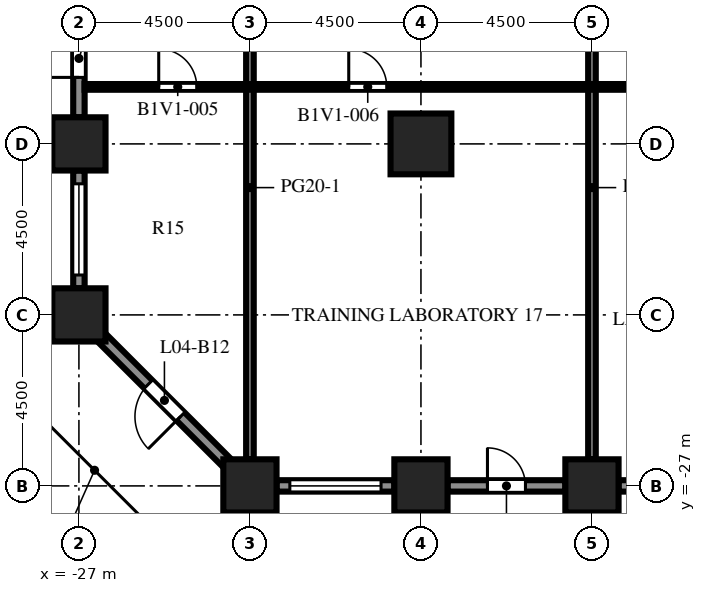
"""IFC4 building model, lengths in metres.
Left out: names, types, materials, properties, quantities, classifications, styles, units other than length and angle.
Written with IfcOpenShell. Run it as: python <this file> out.ifc"""

import sys

from ifc_helpers import new_model, si_unit, direction, frame, frame_2d, origin, origin_2d, place, context, subcontext, project, spatial, rectangle, extrude, element, fill, save


model = new_model("IFC4")
c1 = context("Model", 3, precision=1e-05, world=origin(), true_north=direction((0.0, 1.0)))
c2 = subcontext(c1, "Body", "Model", "MODEL_VIEW")
j1 = project(units=[si_unit("LENGTHUNIT", "METRE"), si_unit("PLANEANGLEUNIT", "RADIAN")], contexts=[c1])
p1 = place(None, origin())
s1 = spatial("IfcSite", under=j1, at=p1, CompositionType="ELEMENT")
p2 = place(p1, origin())
s2 = spatial("IfcBuilding", under=s1, at=p2, CompositionType="ELEMENT")
p3 = place(p2, frame((0.0, 0.0, 19.5)))
s3 = spatial("IfcBuildingStorey", under=s2, at=p3, CompositionType="ELEMENT", Elevation=19.5)
for number, where, z_axis, x_axis in (
    (1, (-27.0, -22.5, 0.0), (0.0, 0.0, 1.0), (1.0, 0.0, 0.0)),
    (2, (-27.0, -18.0, 0.0), (0.0, 0.0, 1.0), (1.0, 0.0, 0.0)),
    (3, (-22.5, -27.0, 0.0), (0.0, 0.0, 1.0), (1.0, 0.0, 0.0)),
    (4, (-18.0, -27.0, 0.0), (0.0, 0.0, 1.0), (1.0, 0.0, 0.0)),
    (5, (-13.5, -27.0, 0.0), (0.0, 0.0, 1.0), (1.0, 0.0, 0.0)),
):
    element("IfcColumn", number, at=place(p3, frame(where, z_axis=z_axis, x_axis=x_axis)), inside=s3, PredefinedType="COLUMN", context=c2, shape_type="SweptSolid", body=[
        extrude(rectangle(XDim=1.4, YDim=1.4, at=origin_2d()), origin(), (0.0, 0.0, 1.0), 4.1),
    ])
p4 = place(p3, frame((-18.0, -18.0, 0.0), z_axis=(0.0, 0.0, 1.0), x_axis=(1.0, 0.0, 0.0)))
e6 = element("IfcColumn", 6, at=p4, inside=s3, PredefinedType="COLUMN", context=c2, shape_type="SweptSolid", body=[
    extrude(rectangle(XDim=1.6, YDim=1.6, at=origin_2d()), origin(), (0.0, 0.0, 1.0), 4.1),
])
p5 = place(p3, frame((-18.7, -27.0, 0.0), z_axis=(0.0, 0.0, 1.0), x_axis=(-1.0, 0.0, 0.0)))
e7 = element("IfcWall", 7, at=p5, inside=s3, PredefinedType="SOLIDWALL", context=c2, shape_type="SweptSolid", body=[
    extrude(rectangle(XDim=3.1, YDim=0.3, at=frame_2d((1.55, 0.0))), origin(), (0.0, 0.0, 1.0), 2.75),
])
p6 = place(p5, frame((0.35, 0.0, 0.8)))
e8 = element("IfcOpeningElement", 8, at=p6, cuts=e7, PredefinedType="OPENING", context=c2, shape_type="SweptSolid", body=[
    extrude(rectangle(XDim=2.4, YDim=1.7, at=frame_2d((1.2, 0.85))), frame((0.0, 0.16, 0.0), z_axis=(0.0, -1.0, 0.0), x_axis=(1.0, 0.0, 0.0)), (0.0, 0.0, 1.0), 0.32),
])
p7 = place(p3, frame((-14.2, -27.0, 0.0), z_axis=(0.0, 0.0, 1.0), x_axis=(-1.0, 0.0, 0.0)))
e9 = element("IfcWall", 9, at=p7, inside=s3, PredefinedType="SOLIDWALL", context=c2, shape_type="SweptSolid", body=[
    extrude(rectangle(XDim=3.1, YDim=0.3, at=frame_2d((1.55, 0.0))), origin(), (0.0, 0.0, 1.0), 2.75),
])
p8 = place(p7, frame((1.05, 0.0, 0.0)))
e10 = element("IfcOpeningElement", 10, at=p8, cuts=e9, PredefinedType="OPENING", context=c2, shape_type="SweptSolid", body=[
    extrude(rectangle(XDim=1.0, YDim=2.2, at=frame_2d((0.5, 1.1))), frame((0.0, 0.16, 0.0), z_axis=(0.0, -1.0, 0.0), x_axis=(1.0, 0.0, 0.0)), (0.0, 0.0, 1.0), 0.32),
])
p9 = place(p3, frame((-9.7, -27.0, 0.0), z_axis=(0.0, 0.0, 1.0), x_axis=(-1.0, 0.0, 0.0)))
e11 = element("IfcWall", 11, at=p9, inside=s3, PredefinedType="SOLIDWALL", context=c2, shape_type="SweptSolid", body=[
    extrude(rectangle(XDim=3.1, YDim=0.3, at=frame_2d((1.55, 0.0))), origin(), (0.0, 0.0, 1.0), 2.75),
])
p10 = place(p9, frame((0.35, 0.0, 0.8)))
e12 = element("IfcOpeningElement", 12, at=p10, cuts=e11, PredefinedType="OPENING", context=c2, shape_type="SweptSolid", body=[
    extrude(rectangle(XDim=2.4, YDim=1.7, at=frame_2d((1.2, 0.85))), frame((0.0, 0.16, 0.0), z_axis=(0.0, -1.0, 0.0), x_axis=(1.0, 0.0, 0.0)), (0.0, 0.0, 1.0), 0.32),
])
p11 = place(p3, frame((-27.0, -17.3, 0.0), z_axis=(0.0, 0.0, 1.0), x_axis=(0.0, 1.0, 0.0)))
e13 = element("IfcWall", 13, at=p11, inside=s3, PredefinedType="SOLIDWALL", context=c2, shape_type="SweptSolid", body=[
    extrude(rectangle(XDim=3.1, YDim=0.3, at=frame_2d((1.55, 0.0))), origin(), (0.0, 0.0, 1.0), 2.75),
])
p12 = place(p11, frame((1.05, 0.0, 0.0)))
e14 = element("IfcOpeningElement", 14, at=p12, cuts=e13, PredefinedType="OPENING", context=c2, shape_type="SweptSolid", body=[
    extrude(rectangle(XDim=1.0, YDim=2.2, at=frame_2d((0.5, 1.1))), frame((0.0, 0.16, 0.0), z_axis=(0.0, -1.0, 0.0), x_axis=(1.0, 0.0, 0.0)), (0.0, 0.0, 1.0), 0.32),
])
p13 = place(p3, frame((-27.0, -21.8, 0.0), z_axis=(0.0, 0.0, 1.0), x_axis=(0.0, 1.0, 0.0)))
e15 = element("IfcWall", 15, at=p13, inside=s3, PredefinedType="SOLIDWALL", context=c2, shape_type="SweptSolid", body=[
    extrude(rectangle(XDim=3.1, YDim=0.3, at=frame_2d((1.55, 0.0))), origin(), (0.0, 0.0, 1.0), 2.75),
])
p14 = place(p13, frame((0.35, 0.0, 0.8)))
e16 = element("IfcOpeningElement", 16, at=p14, cuts=e15, PredefinedType="OPENING", context=c2, shape_type="SweptSolid", body=[
    extrude(rectangle(XDim=2.4, YDim=1.7, at=frame_2d((1.2, 0.85))), frame((0.0, 0.16, 0.0), z_axis=(0.0, -1.0, 0.0), x_axis=(1.0, 0.0, 0.0)), (0.0, 0.0, 1.0), 0.32),
])
p15 = place(p3, frame((-23.094, -26.406, 0.0), z_axis=(0.0, 0.0, 1.0), x_axis=(-0.707106781187, 0.707106781187, 0.0)))
e17 = element("IfcWall", 17, at=p15, inside=s3, PredefinedType="SOLIDWALL", context=c2, shape_type="SweptSolid", body=[
    extrude(rectangle(XDim=4.684, YDim=0.3, at=frame_2d((2.342, 0.0))), origin(), (0.0, 0.0, 1.0), 2.75),
])
p16 = place(p15, frame((1.742, 0.0, 0.0)))
e18 = element("IfcOpeningElement", 18, at=p16, cuts=e17, PredefinedType="OPENING", context=c2, shape_type="SweptSolid", body=[
    extrude(rectangle(XDim=1.2, YDim=2.2, at=frame_2d((0.6, 1.1))), frame((0.0, 0.16, 0.0), z_axis=(0.0, -1.0, 0.0), x_axis=(1.0, 0.0, 0.0)), (0.0, 0.0, 1.0), 0.32),
])
for number, where, z_axis, x_axis in (
    (19, (-22.5, -26.3, 0.0), (0.0, 0.0, 1.0), (0.0, 1.0, 0.0)),
    (20, (-13.5, -26.3, 0.0), (0.0, 0.0, 1.0), (0.0, 1.0, 0.0)),
):
    element("IfcWall", number, at=place(p3, frame(where, z_axis=z_axis, x_axis=x_axis)), inside=s3, PredefinedType="PARTITIONING", context=c2, shape_type="SweptSolid", body=[
        extrude(rectangle(XDim=14.3, YDim=0.2, at=frame_2d((7.15, 0.0))), origin(), (0.0, 0.0, 1.0), 3.65),
    ])
p17 = place(p3, frame((26.85, -16.5, 0.0), z_axis=(0.0, 0.0, 1.0), x_axis=(-1.0, 0.0, 0.0)))
e21 = element("IfcWall", 21, at=p17, inside=s3, PredefinedType="PARTITIONING", context=c2, shape_type="SweptSolid", body=[
    extrude(rectangle(XDim=53.7, YDim=0.15, at=frame_2d((26.85, 0.0))), origin(), (0.0, 0.0, 1.0), 3.65),
])
p18 = place(p17, frame((50.75, 0.0, 0.0)))
e22 = element("IfcOpeningElement", 22, at=p18, cuts=e21, PredefinedType="OPENING", context=c2, shape_type="SweptSolid", body=[
    extrude(rectangle(XDim=1.0, YDim=2.1, at=frame_2d((0.5, 1.05))), frame((0.0, 0.085, 0.0), z_axis=(0.0, -1.0, 0.0), x_axis=(1.0, 0.0, 0.0)), (0.0, 0.0, 1.0), 0.17),
])
p19 = place(p17, frame((45.75, 0.0, 0.0)))
e23 = element("IfcOpeningElement", 23, at=p19, cuts=e21, PredefinedType="OPENING", context=c2, shape_type="SweptSolid", body=[
    extrude(rectangle(XDim=1.0, YDim=2.1, at=frame_2d((0.5, 1.05))), frame((0.0, 0.085, 0.0), z_axis=(0.0, -1.0, 0.0), x_axis=(1.0, 0.0, 0.0)), (0.0, 0.0, 1.0), 0.17),
])
p20 = place(p17, frame((37.75, 0.0, 0.0)))
e24 = element("IfcOpeningElement", 24, at=p20, cuts=e21, PredefinedType="OPENING", context=c2, shape_type="SweptSolid", body=[
    extrude(rectangle(XDim=1.0, YDim=2.1, at=frame_2d((0.5, 1.05))), frame((0.0, 0.085, 0.0), z_axis=(0.0, -1.0, 0.0), x_axis=(1.0, 0.0, 0.0)), (0.0, 0.0, 1.0), 0.17),
])
p21 = place(p17, frame((28.25, 0.0, 0.0)))
e25 = element("IfcOpeningElement", 25, at=p21, cuts=e21, PredefinedType="OPENING", context=c2, shape_type="SweptSolid", body=[
    extrude(rectangle(XDim=1.0, YDim=2.1, at=frame_2d((0.5, 1.05))), frame((0.0, 0.085, 0.0), z_axis=(0.0, -1.0, 0.0), x_axis=(1.0, 0.0, 0.0)), (0.0, 0.0, 1.0), 0.17),
])
p22 = place(p17, frame((19.75, 0.0, 0.0)))
e26 = element("IfcOpeningElement", 26, at=p22, cuts=e21, PredefinedType="OPENING", context=c2, shape_type="SweptSolid", body=[
    extrude(rectangle(XDim=1.0, YDim=2.1, at=frame_2d((0.5, 1.05))), frame((0.0, 0.085, 0.0), z_axis=(0.0, -1.0, 0.0), x_axis=(1.0, 0.0, 0.0)), (0.0, 0.0, 1.0), 0.17),
])
p23 = place(p17, frame((13.5, 0.0, 0.0)))
e27 = element("IfcOpeningElement", 27, at=p23, cuts=e21, PredefinedType="OPENING", context=c2, shape_type="SweptSolid", body=[
    extrude(rectangle(XDim=1.0, YDim=2.1, at=frame_2d((0.5, 1.05))), frame((0.0, 0.085, 0.0), z_axis=(0.0, -1.0, 0.0), x_axis=(1.0, 0.0, 0.0)), (0.0, 0.0, 1.0), 0.17),
])
p24 = place(p17, frame((6.75, 0.0, 0.0)))
e28 = element("IfcOpeningElement", 28, at=p24, cuts=e21, PredefinedType="OPENING", context=c2, shape_type="SweptSolid", body=[
    extrude(rectangle(XDim=1.0, YDim=2.1, at=frame_2d((0.5, 1.05))), frame((0.0, 0.085, 0.0), z_axis=(0.0, -1.0, 0.0), x_axis=(1.0, 0.0, 0.0)), (0.0, 0.0, 1.0), 0.17),
])
p25 = place(p17, frame((1.25, 0.0, 0.0)))
e29 = element("IfcOpeningElement", 29, at=p25, cuts=e21, PredefinedType="OPENING", context=c2, shape_type="SweptSolid", body=[
    extrude(rectangle(XDim=1.0, YDim=2.1, at=frame_2d((0.5, 1.05))), frame((0.0, 0.085, 0.0), z_axis=(0.0, -1.0, 0.0), x_axis=(1.0, 0.0, 0.0)), (0.0, 0.0, 1.0), 0.17),
])
p26 = place(p6, origin())
e30 = element("IfcWindow", 30, at=p26, inside=s3, PartitioningType="SINGLE_PANEL", PredefinedType="WINDOW", context=c2, shape_type="SweptSolid", body=[
    extrude(rectangle(XDim=2.4, YDim=1.7, at=frame_2d((1.2, 0.85))), frame((0.0, 0.03, 0.0), z_axis=(0.0, -1.0, 0.0), x_axis=(1.0, 0.0, 0.0)), (0.0, 0.0, 1.0), 0.06),
])
fill(e8, e30)
p27 = place(p8, origin())
e31 = element("IfcDoor", 31, at=p27, inside=s3, OperationType="SINGLE_SWING_RIGHT", PredefinedType="DOOR", context=c2, shape_type="SweptSolid", body=[
    extrude(rectangle(XDim=1.0, YDim=2.2, at=frame_2d((0.5, 1.1))), frame((0.0, 0.025, 0.0), z_axis=(0.0, -1.0, 0.0), x_axis=(1.0, 0.0, 0.0)), (0.0, 0.0, 1.0), 0.05),
])
fill(e10, e31)
p28 = place(p12, origin())
e32 = element("IfcDoor", 32, at=p28, inside=s3, OperationType="SINGLE_SWING_LEFT", PredefinedType="DOOR", context=c2, shape_type="SweptSolid", body=[
    extrude(rectangle(XDim=1.0, YDim=2.2, at=frame_2d((0.5, 1.1))), frame((0.0, 0.025, 0.0), z_axis=(0.0, -1.0, 0.0), x_axis=(1.0, 0.0, 0.0)), (0.0, 0.0, 1.0), 0.05),
])
fill(e14, e32)
p29 = place(p14, origin())
e33 = element("IfcWindow", 33, at=p29, inside=s3, PartitioningType="SINGLE_PANEL", PredefinedType="WINDOW", context=c2, shape_type="SweptSolid", body=[
    extrude(rectangle(XDim=2.4, YDim=1.7, at=frame_2d((1.2, 0.85))), frame((0.0, 0.03, 0.0), z_axis=(0.0, -1.0, 0.0), x_axis=(1.0, 0.0, 0.0)), (0.0, 0.0, 1.0), 0.06),
])
fill(e16, e33)
p30 = place(p16, origin())
e34 = element("IfcDoor", 34, at=p30, inside=s3, OperationType="SINGLE_SWING_LEFT", PredefinedType="DOOR", context=c2, shape_type="SweptSolid", body=[
    extrude(rectangle(XDim=1.2, YDim=2.2, at=frame_2d((0.6, 1.1))), frame((0.0, 0.025, 0.0), z_axis=(0.0, -1.0, 0.0), x_axis=(1.0, 0.0, 0.0)), (0.0, 0.0, 1.0), 0.05),
])
fill(e18, e34)
p31 = place(p18, origin())
e35 = element("IfcDoor", 35, at=p31, inside=s3, OperationType="SINGLE_SWING_RIGHT", PredefinedType="DOOR", context=c2, shape_type="SweptSolid", body=[
    extrude(rectangle(XDim=1.0, YDim=2.1, at=frame_2d((0.5, 1.05))), frame((0.0, 0.025, 0.0), z_axis=(0.0, -1.0, 0.0), x_axis=(1.0, 0.0, 0.0)), (0.0, 0.0, 1.0), 0.05),
])
fill(e22, e35)
p32 = place(p19, origin())
e36 = element("IfcDoor", 36, at=p32, inside=s3, OperationType="SINGLE_SWING_RIGHT", PredefinedType="DOOR", context=c2, shape_type="SweptSolid", body=[
    extrude(rectangle(XDim=1.0, YDim=2.1, at=frame_2d((0.5, 1.05))), frame((0.0, 0.025, 0.0), z_axis=(0.0, -1.0, 0.0), x_axis=(1.0, 0.0, 0.0)), (0.0, 0.0, 1.0), 0.05),
])
fill(e23, e36)
save(model, sys.argv[1])
